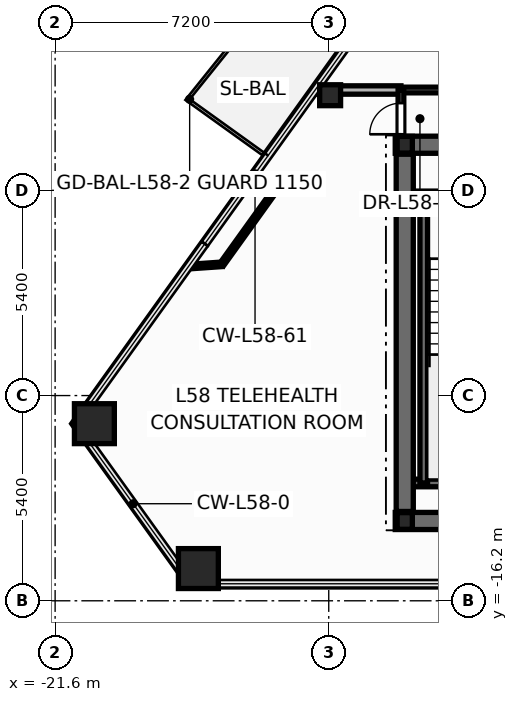
"""IFC4 building model, lengths in metres.
Left out: names, types, materials, properties, quantities, classifications, styles, units other than length and angle.
Written with IfcOpenShell. Run it as: python <this file> out.ifc"""

import sys

from ifc_helpers import new_model, si_unit, direction, frame, frame_2d, origin, origin_2d, place, context, subcontext, project, spatial, rectangle, hollow_rectangle, hollow_circle, i_section, extrude, element, fill, save


model = new_model("IFC4")
c1 = context("Model", 3, precision=1e-05, world=origin(), true_north=direction((0.0, 1.0)))
c2 = subcontext(c1, "Body", "Model", "MODEL_VIEW")
j1 = project(units=[si_unit("LENGTHUNIT", "METRE"), si_unit("PLANEANGLEUNIT", "RADIAN")], contexts=[c1])
p1 = place(None, origin())
s1 = spatial("IfcSite", under=j1, at=p1, CompositionType="ELEMENT")
p2 = place(p1, origin())
s2 = spatial("IfcBuilding", under=s1, at=p2, CompositionType="ELEMENT")
p3 = place(p2, frame((0.0, 0.0, 221.7)))
s3 = spatial("IfcBuildingStorey", under=s2, at=p3, CompositionType="ELEMENT", Elevation=221.7)
for number, where, z_axis, x_axis in (
    (1, (-20.567, -11.54, 0.0), (0.0, 0.0, 1.0), (1.0, 0.0, 0.0)),
    (2, (-17.83, -15.352, 0.0), (0.0, 0.0, 1.0), (1.0, 0.0, 0.0)),
):
    element("IfcColumn", number, at=place(p3, frame(where, z_axis=z_axis, x_axis=x_axis)), inside=s3, PredefinedType="COLUMN", context=c2, shape_type="SweptSolid", body=[
        extrude(hollow_rectangle(XDim=1.05, YDim=1.05, WallThickness=0.045, at=origin_2d()), origin(), (0.0, 0.0, 1.0), 3.6),
    ])
p4 = place(p3, frame((-14.363, -2.897, 0.0), z_axis=(0.0, 0.0, 1.0), x_axis=(1.0, 0.0, 0.0)))
e3 = element("IfcColumn", 3, at=p4, inside=s3, PredefinedType="COLUMN", context=c2, shape_type="SweptSolid", body=[
    extrude(hollow_circle(Radius=0.275, WallThickness=0.024, at=origin_2d()), origin(), (0.0, 0.0, 1.0), 3.6),
])
for number, where, z_axis, x_axis in (
    (4, (-12.4, -14.1, 0.0), (0.0, 0.0, 1.0), (1.0, 0.0, 0.0)),
    (5, (-12.4, -4.2, 0.0), (0.0, 0.0, 1.0), (1.0, 0.0, 0.0)),
):
    element("IfcColumn", number, at=place(p3, frame(where, z_axis=z_axis, x_axis=x_axis)), inside=s3, PredefinedType="COLUMN", context=c2, shape_type="SweptSolid", body=[
        extrude(i_section(OverallWidth=0.4, OverallDepth=0.44, WebThickness=0.028, FlangeThickness=0.04, at=origin_2d()), origin(), (0.0, 0.0, 1.0), 3.6),
    ])
p5 = place(p3, frame((-12.65, -14.1, 0.0), z_axis=(0.0, 0.0, 1.0), x_axis=(1.0, 0.0, 0.0)))
e6 = element("IfcWall", 6, at=p5, inside=s3, PredefinedType="SHEAR", context=c2, shape_type="SweptSolid", body=[
    extrude(rectangle(XDim=25.3, YDim=0.45, at=frame_2d((12.65, 0.0))), origin(), (0.0, 0.0, 1.0), 3.6),
])
p6 = place(p3, frame((-12.65, -4.2, 0.0), z_axis=(0.0, 0.0, 1.0), x_axis=(1.0, 0.0, 0.0)))
e7 = element("IfcWall", 7, at=p6, inside=s3, PredefinedType="SHEAR", context=c2, shape_type="SweptSolid", body=[
    extrude(rectangle(XDim=25.3, YDim=0.45, at=frame_2d((12.65, 0.0))), origin(), (0.0, 0.0, 1.0), 3.6),
])
p7 = place(p6, frame((1.85, 0.0, 0.0)))
e8 = element("IfcOpeningElement", 8, at=p7, cuts=e7, PredefinedType="OPENING", context=c2, shape_type="SweptSolid", body=[
    extrude(rectangle(XDim=0.756, YDim=2.054, at=frame_2d((0.375, 1.027))), frame((0.0, 0.235, 0.0), z_axis=(0.0, -1.0, 0.0), x_axis=(1.0, 0.0, 0.0)), (0.0, 0.0, 1.0), 0.47),
])
p8 = place(p6, frame((21.85, 0.0, 0.0)))
e9 = element("IfcOpeningElement", 9, at=p8, cuts=e7, PredefinedType="OPENING", context=c2, shape_type="SweptSolid", body=[
    extrude(rectangle(XDim=0.756, YDim=2.054, at=frame_2d((0.375, 1.027))), frame((0.0, 0.235, 0.0), z_axis=(0.0, -1.0, 0.0), x_axis=(1.0, 0.0, 0.0)), (0.0, 0.0, 1.0), 0.47),
])
p9 = place(p6, frame((23.5, 0.0, 0.0)))
e10 = element("IfcOpeningElement", 10, at=p9, cuts=e7, PredefinedType="OPENING", context=c2, shape_type="SweptSolid", body=[
    extrude(rectangle(XDim=0.756, YDim=2.054, at=frame_2d((0.375, 1.027))), frame((0.0, 0.235, 0.0), z_axis=(0.0, -1.0, 0.0), x_axis=(1.0, 0.0, 0.0)), (0.0, 0.0, 1.0), 0.47),
])
p10 = place(p6, frame((5.85, 0.0, 0.0)))
e11 = element("IfcOpeningElement", 11, at=p10, cuts=e7, PredefinedType="OPENING", context=c2, shape_type="SweptSolid", body=[
    extrude(rectangle(XDim=1.006, YDim=2.104, at=frame_2d((0.5, 1.052))), frame((0.0, 0.235, 0.0), z_axis=(0.0, -1.0, 0.0), x_axis=(1.0, 0.0, 0.0)), (0.0, 0.0, 1.0), 0.47),
])
p11 = place(p6, frame((10.35, 0.0, 0.0)))
e12 = element("IfcOpeningElement", 12, at=p11, cuts=e7, PredefinedType="OPENING", context=c2, shape_type="SweptSolid", body=[
    extrude(rectangle(XDim=1.406, YDim=2.154, at=frame_2d((0.7, 1.077))), frame((0.0, 0.235, 0.0), z_axis=(0.0, -1.0, 0.0), x_axis=(1.0, 0.0, 0.0)), (0.0, 0.0, 1.0), 0.47),
])
p12 = place(p6, frame((18.45, 0.0, 0.0)))
e13 = element("IfcOpeningElement", 13, at=p12, cuts=e7, PredefinedType="OPENING", context=c2, shape_type="SweptSolid", body=[
    extrude(rectangle(XDim=1.006, YDim=2.104, at=frame_2d((0.5, 1.052))), frame((0.0, 0.235, 0.0), z_axis=(0.0, -1.0, 0.0), x_axis=(1.0, 0.0, 0.0)), (0.0, 0.0, 1.0), 0.47),
])
for number, where, z_axis, x_axis in (
    (14, (-12.35, -5.52, 0.0), (0.0, 0.0, 1.0), (1.0, 0.0, 0.0)),
    (15, (-12.35, -13.1, 0.0), (0.0, 0.0, 1.0), (1.0, 0.0, 0.0)),
):
    element("IfcWall", number, at=place(p3, frame(where, z_axis=z_axis, x_axis=x_axis)), inside=s3, PredefinedType="SOLIDWALL", context=c2, shape_type="SweptSolid", body=[
        extrude(rectangle(XDim=3.87, YDim=0.2, at=frame_2d((1.935, 0.0))), origin(), (0.0, 0.0, 1.0), 3.6),
    ])
p13 = place(p3, frame((-11.9, -13.1, 0.0), z_axis=(0.0, 0.0, 1.0), x_axis=(0.0, 1.0, 0.0)))
e16 = element("IfcWall", 16, at=p13, inside=s3, PredefinedType="SOLIDWALL", context=c2, shape_type="SweptSolid", body=[
    extrude(rectangle(XDim=7.58, YDim=0.2, at=frame_2d((3.79, 0.0))), origin(), (0.0, 0.0, 1.0), 3.6),
])
p14 = place(p3, frame((-12.4, -13.85, 0.0), z_axis=(0.0, 0.0, 1.0), x_axis=(0.0, 1.0, 0.0)))
e17 = element("IfcWall", 17, at=p14, inside=s3, PredefinedType="SHEAR", context=c2, shape_type="SweptSolid", body=[
    extrude(rectangle(XDim=9.4, YDim=0.45, at=frame_2d((4.7, 0.0))), origin(), (0.0, 0.0, 1.0), 3.6),
])
p15 = place(p3, frame((-12.5, -2.76, 0.0), z_axis=(0.0, 0.0, 1.0), x_axis=(1.0, 0.0, 0.0)))
e18 = element("IfcWall", 18, at=p15, inside=s3, PredefinedType="PARTITIONING", context=c2, shape_type="SweptSolid", body=[
    extrude(rectangle(XDim=7.16, YDim=0.15, at=frame_2d((3.58, 0.0))), origin(), (0.0, 0.0, 1.0), 2.32),
])
p16 = place(p15, frame((1.672, 0.0, 0.0)))
e19 = element("IfcOpeningElement", 19, at=p16, cuts=e18, PredefinedType="OPENING", context=c2, shape_type="SweptSolid", body=[
    extrude(rectangle(XDim=0.956, YDim=2.104, at=frame_2d((0.475, 1.052))), frame((0.0, 0.085, 0.0), z_axis=(0.0, -1.0, 0.0), x_axis=(1.0, 0.0, 0.0)), (0.0, 0.0, 1.0), 0.17),
])
p17 = place(p3, frame((-15.801, -5.38, 0.0), z_axis=(0.0, 0.0, 1.0), x_axis=(-0.583201664134, -0.812327408716, 0.0)))
e20 = element("IfcWall", 20, at=p17, inside=s3, PredefinedType="PARTITIONING", context=c2, shape_type="SweptSolid", body=[
    extrude(rectangle(XDim=2.421, YDim=0.12, at=frame_2d((1.21, 0.0))), origin(), (0.0, 0.0, 1.0), 3.345),
])
p18 = place(p3, frame((-14.757, -2.76, 0.0), z_axis=(0.0, 0.0, 1.0), x_axis=(1.0, 0.0, 0.0)))
e21 = element("IfcWall", 21, at=p18, inside=s3, PredefinedType="PARTITIONING", context=c2, shape_type="SweptSolid", body=[
    extrude(rectangle(XDim=2.257, YDim=0.22, at=frame_2d((1.129, 0.0))), origin(), (0.0, 0.0, 1.0), 2.62),
])
p19 = place(p3, frame((-12.5, -4.24, 0.0), z_axis=(0.0, 0.0, 1.0), x_axis=(0.0, 1.0, 0.0)))
e22 = element("IfcWall", 22, at=p19, inside=s3, PredefinedType="PARTITIONING", context=c2, shape_type="SweptSolid", body=[
    extrude(rectangle(XDim=1.48, YDim=0.15, at=frame_2d((0.74, 0.0))), origin(), (0.0, 0.0, 1.0), 2.32),
])
p20 = place(p19, frame((0.315, 0.0, 0.0)))
e23 = element("IfcOpeningElement", 23, at=p20, cuts=e22, PredefinedType="OPENING", context=c2, shape_type="SweptSolid", body=[
    extrude(rectangle(XDim=0.826, YDim=2.104, at=frame_2d((0.41, 1.052))), frame((0.0, 0.085, 0.0), z_axis=(0.0, -1.0, 0.0), x_axis=(1.0, 0.0, 0.0)), (0.0, 0.0, 1.0), 0.17),
])
p21 = place(p3, frame((-17.213, -7.347, 0.0), z_axis=(0.0, 0.0, 1.0), x_axis=(-0.997593647417, -0.069331916407, 0.0)))
e24 = element("IfcWall", 24, at=p21, inside=s3, PredefinedType="PARTITIONING", context=c2, shape_type="SweptSolid", body=[
    extrude(rectangle(XDim=0.87, YDim=0.12, at=frame_2d((0.435, 0.0))), origin(), (0.0, 0.0, 1.0), 2.863),
])
p22 = place(p3, frame((-16.345, -4.99, 0.0), z_axis=(0.0, 0.0, 1.0), x_axis=(0.812328158573, -0.583200619675, 0.0)))
e25 = element("IfcWall", 25, at=p22, inside=s3, PredefinedType="PARTITIONING", context=c2, shape_type="SweptSolid", body=[
    extrude(rectangle(XDim=0.67, YDim=0.12, at=frame_2d((0.335, 0.0))), origin(), (0.0, 0.0, 1.0), 2.863),
])
p23 = place(p20, origin())
e26 = element("IfcDoor", 26, at=p23, inside=s3, OperationType="SINGLE_SWING_LEFT", PredefinedType="DOOR", context=c2, shape_type="SweptSolid", body=[
    extrude(rectangle(XDim=0.82, YDim=2.1, at=frame_2d((0.41, 1.05))), frame((0.0, 0.025, 0.0), z_axis=(0.0, -1.0, 0.0), x_axis=(1.0, 0.0, 0.0)), (0.0, 0.0, 1.0), 0.05),
])
fill(e23, e26)
save(model, sys.argv[1])
